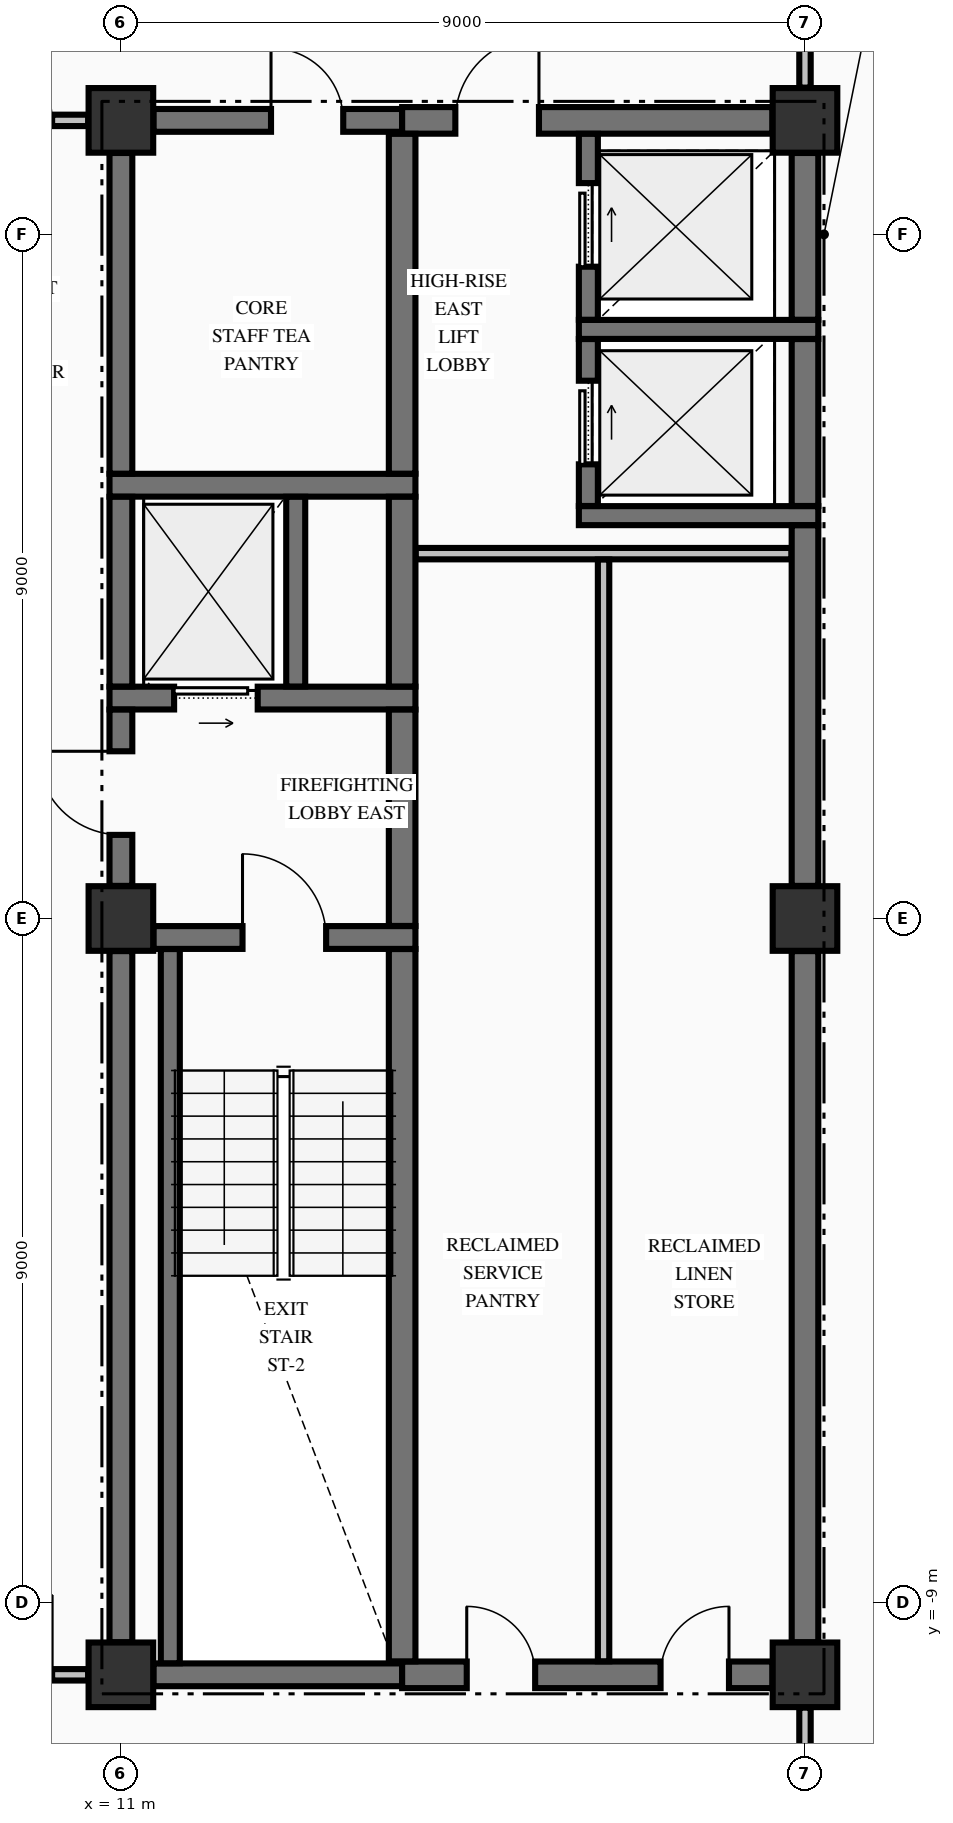
"""IFC4 building model, lengths in metres.
Left out: names, types, materials, properties, quantities, classifications, styles, units other than length and angle.
Written with IfcOpenShell. Run it as: python <this file> out.ifc"""

import sys

from ifc_helpers import new_model, si_unit, direction, frame, frame_2d, origin, origin_2d, place, context, subcontext, project, spatial, rectangle, extrude, element, fill, save


model = new_model("IFC4")
c1 = context("Model", 3, precision=1e-05, world=origin(), true_north=direction((0.0, 1.0)))
c2 = subcontext(c1, "Body", "Model", "MODEL_VIEW")
j1 = project(units=[si_unit("LENGTHUNIT", "METRE"), si_unit("PLANEANGLEUNIT", "RADIAN")], contexts=[c1])
p1 = place(None, origin())
s1 = spatial("IfcSite", under=j1, at=p1, CompositionType="ELEMENT")
p2 = place(p1, origin())
s2 = spatial("IfcBuilding", under=s1, at=p2, CompositionType="ELEMENT")
p3 = place(p2, frame((0.0, 0.0, 211.86)))
s3 = spatial("IfcBuildingStorey", under=s2, at=p3, CompositionType="ELEMENT", Elevation=211.86)
for number, where, z_axis, x_axis in (
    (1, (11.0, -9.95, -0.325), (0.0, 0.0, 1.0), (1.0, 0.0, 0.0)),
    (2, (11.0, 0.0, -0.325), (0.0, 0.0, 1.0), (1.0, 0.0, 0.0)),
    (3, (11.0, 10.5, -0.325), (0.0, 0.0, 1.0), (1.0, 0.0, 0.0)),
    (4, (20.0, -9.95, -0.325), (0.0, 0.0, 1.0), (1.0, 0.0, 0.0)),
    (5, (20.0, 10.5, -0.325), (0.0, 0.0, 1.0), (1.0, 0.0, 0.0)),
    (6, (20.0, 0.0, -0.325), (0.0, 0.0, 1.0), (1.0, 0.0, 0.0)),
):
    element("IfcColumn", number, at=place(p3, frame(where, z_axis=z_axis, x_axis=x_axis)), inside=s3, PredefinedType="COLUMN", context=c2, shape_type="SweptSolid", body=[
        extrude(rectangle(XDim=0.85, YDim=0.85, at=origin_2d()), origin(), (0.0, 0.0, 1.0), 3.475),
    ])
p4 = place(p3, frame((11.429, -9.95, 0.0), z_axis=(0.0, 0.0, 1.0), x_axis=(1.0, 0.0, 0.0)))
e7 = element("IfcWall", 7, at=p4, inside=s3, PredefinedType="SHEAR", context=c2, shape_type="SweptSolid", body=[
    extrude(rectangle(XDim=3.271, YDim=0.3, at=frame_2d((1.635, 0.0))), origin(), (0.0, 0.0, 1.0), 3.15),
])
p5 = place(p3, frame((14.7, -9.95, 0.0), z_axis=(0.0, 0.0, 1.0), x_axis=(1.0, 0.0, 0.0)))
e8 = element("IfcWall", 8, at=p5, inside=s3, PredefinedType="SHEAR", context=c2, shape_type="SweptSolid", body=[
    extrude(rectangle(XDim=4.871, YDim=0.35, at=frame_2d((2.436, 0.0))), origin(), (0.0, 0.0, 1.0), 3.15),
])
p6 = place(p5, frame((0.85, 0.0, 0.0)))
e9 = element("IfcOpeningElement", 9, at=p6, cuts=e8, PredefinedType="OPENING", context=c2, shape_type="SweptSolid", body=[
    extrude(rectangle(XDim=0.9, YDim=2.15, at=frame_2d((0.45, 1.075))), frame((0.0, 0.185, 0.0), z_axis=(0.0, -1.0, 0.0), x_axis=(1.0, 0.0, 0.0)), (0.0, 0.0, 1.0), 0.37),
])
p7 = place(p5, frame((3.4, 0.0, 0.0)))
e10 = element("IfcOpeningElement", 10, at=p7, cuts=e8, PredefinedType="OPENING", context=c2, shape_type="SweptSolid", body=[
    extrude(rectangle(XDim=0.9, YDim=2.15, at=frame_2d((0.45, 1.075))), frame((0.0, 0.185, 0.0), z_axis=(0.0, -1.0, 0.0), x_axis=(1.0, 0.0, 0.0)), (0.0, 0.0, 1.0), 0.37),
])
p8 = place(p3, frame((11.429, -0.25, 0.0), z_axis=(0.0, 0.0, 1.0), x_axis=(1.0, 0.0, 0.0)))
e11 = element("IfcWall", 11, at=p8, inside=s3, PredefinedType="SHEAR", context=c2, shape_type="SweptSolid", body=[
    extrude(rectangle(XDim=3.446, YDim=0.3, at=frame_2d((1.723, 0.0))), origin(), (0.0, 0.0, 1.0), 3.15),
])
p9 = place(p8, frame((1.171, 0.0, 0.0)))
e12 = element("IfcOpeningElement", 12, at=p9, cuts=e11, PredefinedType="OPENING", context=c2, shape_type="SweptSolid", body=[
    extrude(rectangle(XDim=1.1, YDim=2.15, at=frame_2d((0.55, 1.075))), frame((0.0, 0.16, 0.0), z_axis=(0.0, -1.0, 0.0), x_axis=(1.0, 0.0, 0.0)), (0.0, 0.0, 1.0), 0.32),
])
p10 = place(p3, frame((10.85, 2.9, 0.0), z_axis=(0.0, 0.0, 1.0), x_axis=(1.0, 0.0, 0.0)))
e13 = element("IfcWall", 13, at=p10, inside=s3, PredefinedType="SHEAR", context=c2, shape_type="SweptSolid", body=[
    extrude(rectangle(XDim=4.025, YDim=0.3, at=frame_2d((2.012, 0.0))), origin(), (0.0, 0.0, 1.0), 3.15),
])
p11 = place(p10, frame((0.85, 0.0, 0.0)))
e14 = element("IfcOpeningElement", 14, at=p11, cuts=e13, PredefinedType="OPENING", context=c2, shape_type="SweptSolid", body=[
    extrude(rectangle(XDim=1.1, YDim=2.2, at=frame_2d((0.55, 1.1))), frame((0.0, 0.16, 0.0), z_axis=(0.0, -1.0, 0.0), x_axis=(1.0, 0.0, 0.0)), (0.0, 0.0, 1.0), 0.32),
])
p12 = place(p3, frame((17.025, 5.3, 0.0), z_axis=(0.0, 0.0, 1.0), x_axis=(1.0, 0.0, 0.0)))
e15 = element("IfcWall", 15, at=p12, inside=s3, PredefinedType="SOLIDWALL", context=c2, shape_type="SweptSolid", body=[
    extrude(rectangle(XDim=3.15, YDim=0.25, at=frame_2d((1.575, 0.0))), origin(), (0.0, 0.0, 1.0), 3.15),
])
p13 = place(p3, frame((10.85, 5.7, 0.0), z_axis=(0.0, 0.0, 1.0), x_axis=(1.0, 0.0, 0.0)))
e16 = element("IfcWall", 16, at=p13, inside=s3, PredefinedType="SHEAR", context=c2, shape_type="SweptSolid", body=[
    extrude(rectangle(XDim=4.025, YDim=0.3, at=frame_2d((2.012, 0.0))), origin(), (0.0, 0.0, 1.0), 3.15),
])
p14 = place(p3, frame((17.025, 7.75, 0.0), z_axis=(0.0, 0.0, 1.0), x_axis=(1.0, 0.0, 0.0)))
e17 = element("IfcWall", 17, at=p14, inside=s3, PredefinedType="SOLIDWALL", context=c2, shape_type="SweptSolid", body=[
    extrude(rectangle(XDim=3.15, YDim=0.25, at=frame_2d((1.575, 0.0))), origin(), (0.0, 0.0, 1.0), 3.15),
])
p15 = place(p3, frame((11.429, 10.5, 0.0), z_axis=(0.0, 0.0, 1.0), x_axis=(1.0, 0.0, 0.0)))
e18 = element("IfcWall", 18, at=p15, inside=s3, PredefinedType="SHEAR", context=c2, shape_type="SweptSolid", body=[
    extrude(rectangle(XDim=3.271, YDim=0.3, at=frame_2d((1.635, 0.0))), origin(), (0.0, 0.0, 1.0), 3.15),
])
p16 = place(p15, frame((1.546, 0.0, 0.0)))
e19 = element("IfcOpeningElement", 19, at=p16, cuts=e18, PredefinedType="OPENING", context=c2, shape_type="SweptSolid", body=[
    extrude(rectangle(XDim=0.95, YDim=2.15, at=frame_2d((0.475, 1.075))), frame((0.0, 0.16, 0.0), z_axis=(0.0, -1.0, 0.0), x_axis=(1.0, 0.0, 0.0)), (0.0, 0.0, 1.0), 0.32),
])
p17 = place(p3, frame((14.7, 10.5, 0.0), z_axis=(0.0, 0.0, 1.0), x_axis=(1.0, 0.0, 0.0)))
e20 = element("IfcWall", 20, at=p17, inside=s3, PredefinedType="SHEAR", context=c2, shape_type="SweptSolid", body=[
    extrude(rectangle(XDim=4.871, YDim=0.35, at=frame_2d((2.436, 0.0))), origin(), (0.0, 0.0, 1.0), 3.15),
])
p18 = place(p17, frame((0.7, 0.0, 0.0)))
e21 = element("IfcOpeningElement", 21, at=p18, cuts=e20, PredefinedType="OPENING", context=c2, shape_type="SweptSolid", body=[
    extrude(rectangle(XDim=1.1, YDim=2.15, at=frame_2d((0.55, 1.075))), frame((0.0, 0.185, 0.0), z_axis=(0.0, -1.0, 0.0), x_axis=(1.0, 0.0, 0.0)), (0.0, 0.0, 1.0), 0.37),
])
p19 = place(p3, frame((-10.569, -9.95, 0.0), z_axis=(0.0, 0.0, 1.0), x_axis=(1.0, 0.0, 0.0)))
e22 = element("IfcWall", 22, at=p19, inside=s3, PredefinedType="PARTITIONING", context=c2, shape_type="SweptSolid", body=[
    extrude(rectangle(XDim=21.138, YDim=0.15, at=frame_2d((10.569, 0.0))), origin(), (0.0, 0.0, 1.0), 3.15),
])
p20 = place(p19, frame((0.474, 0.0, 0.0)))
e23 = element("IfcOpeningElement", 23, at=p20, cuts=e22, PredefinedType="OPENING", context=c2, shape_type="SweptSolid", body=[
    extrude(rectangle(XDim=1.05, YDim=2.15, at=frame_2d((0.525, 1.075))), frame((0.0, 0.085, 0.0), z_axis=(0.0, -1.0, 0.0), x_axis=(1.0, 0.0, 0.0)), (0.0, 0.0, 1.0), 0.17),
])
p21 = place(p19, frame((19.614, 0.0, 0.0)))
e24 = element("IfcOpeningElement", 24, at=p21, cuts=e22, PredefinedType="OPENING", context=c2, shape_type="SweptSolid", body=[
    extrude(rectangle(XDim=1.05, YDim=2.15, at=frame_2d((0.525, 1.075))), frame((0.0, 0.085, 0.0), z_axis=(0.0, -1.0, 0.0), x_axis=(1.0, 0.0, 0.0)), (0.0, 0.0, 1.0), 0.17),
])
p22 = place(p19, frame((11.774, 0.0, 0.0)))
e25 = element("IfcOpeningElement", 25, at=p22, cuts=e22, PredefinedType="OPENING", context=c2, shape_type="SweptSolid", body=[
    extrude(rectangle(XDim=0.95, YDim=2.15, at=frame_2d((0.475, 1.075))), frame((0.0, 0.085, 0.0), z_axis=(0.0, -1.0, 0.0), x_axis=(1.0, 0.0, 0.0)), (0.0, 0.0, 1.0), 0.17),
])
p23 = place(p3, frame((14.878, 4.8, 0.0), z_axis=(0.0, 0.0, 1.0), x_axis=(1.0, 0.0, 0.0)))
e26 = element("IfcWall", 26, at=p23, inside=s3, PredefinedType="PARTITIONING", context=c2, shape_type="SweptSolid", body=[
    extrude(rectangle(XDim=4.944, YDim=0.15, at=frame_2d((2.472, 0.0))), origin(), (0.0, 0.0, 1.0), 3.15),
])
p24 = place(p3, frame((-10.569, 10.5, 0.0), z_axis=(0.0, 0.0, 1.0), x_axis=(1.0, 0.0, 0.0)))
e27 = element("IfcWall", 27, at=p24, inside=s3, PredefinedType="PARTITIONING", context=c2, shape_type="SweptSolid", body=[
    extrude(rectangle(XDim=21.138, YDim=0.15, at=frame_2d((10.569, 0.0))), origin(), (0.0, 0.0, 1.0), 3.15),
])
p25 = place(p24, frame((0.474, 0.0, 0.0)))
e28 = element("IfcOpeningElement", 28, at=p25, cuts=e27, PredefinedType="OPENING", context=c2, shape_type="SweptSolid", body=[
    extrude(rectangle(XDim=1.05, YDim=2.15, at=frame_2d((0.525, 1.075))), frame((0.0, 0.085, 0.0), z_axis=(0.0, -1.0, 0.0), x_axis=(1.0, 0.0, 0.0)), (0.0, 0.0, 1.0), 0.17),
])
p26 = place(p24, frame((19.614, 0.0, 0.0)))
e29 = element("IfcOpeningElement", 29, at=p26, cuts=e27, PredefinedType="OPENING", context=c2, shape_type="SweptSolid", body=[
    extrude(rectangle(XDim=1.05, YDim=2.15, at=frame_2d((0.525, 1.075))), frame((0.0, 0.085, 0.0), z_axis=(0.0, -1.0, 0.0), x_axis=(1.0, 0.0, 0.0)), (0.0, 0.0, 1.0), 0.17),
])
p27 = place(p3, frame((11.0, -9.521, 0.0), z_axis=(0.0, 0.0, 1.0), x_axis=(0.0, 1.0, 0.0)))
e30 = element("IfcWall", 30, at=p27, inside=s3, PredefinedType="SHEAR", context=c2, shape_type="SweptSolid", body=[
    extrude(rectangle(XDim=9.092, YDim=0.3, at=frame_2d((4.546, 0.0))), origin(), (0.0, 0.0, 1.0), 3.15),
])
p28 = place(p3, frame((11.0, 0.429, 0.0), z_axis=(0.0, 0.0, 1.0), x_axis=(0.0, 1.0, 0.0)))
e31 = element("IfcWall", 31, at=p28, inside=s3, PredefinedType="SHEAR", context=c2, shape_type="SweptSolid", body=[
    extrude(rectangle(XDim=2.319, YDim=0.3, at=frame_2d((1.16, 0.0))), origin(), (0.0, 0.0, 1.0), 3.15),
])
p29 = place(p28, frame((0.671, 0.0, 0.0)))
e32 = element("IfcOpeningElement", 32, at=p29, cuts=e31, PredefinedType="OPENING", context=c2, shape_type="SweptSolid", body=[
    extrude(rectangle(XDim=1.1, YDim=2.15, at=frame_2d((0.55, 1.075))), frame((0.0, 0.16, 0.0), z_axis=(0.0, -1.0, 0.0), x_axis=(1.0, 0.0, 0.0)), (0.0, 0.0, 1.0), 0.32),
])
p30 = place(p3, frame((11.0, 3.052, 0.0), z_axis=(0.0, 0.0, 1.0), x_axis=(0.0, 1.0, 0.0)))
e33 = element("IfcWall", 33, at=p30, inside=s3, PredefinedType="SHEAR", context=c2, shape_type="SweptSolid", body=[
    extrude(rectangle(XDim=2.496, YDim=0.3, at=frame_2d((1.248, 0.0))), origin(), (0.0, 0.0, 1.0), 3.15),
])
p31 = place(p3, frame((11.0, 5.852, 0.0), z_axis=(0.0, 0.0, 1.0), x_axis=(0.0, 1.0, 0.0)))
e34 = element("IfcWall", 34, at=p31, inside=s3, PredefinedType="SHEAR", context=c2, shape_type="SweptSolid", body=[
    extrude(rectangle(XDim=4.219, YDim=0.3, at=frame_2d((2.109, 0.0))), origin(), (0.0, 0.0, 1.0), 3.15),
])
p32 = place(p3, frame((11.65, -9.798, 0.0), z_axis=(0.0, 0.0, 1.0), x_axis=(0.0, 1.0, 0.0)))
e35 = element("IfcWall", 35, at=p32, inside=s3, PredefinedType="SOLIDWALL", context=c2, shape_type="SweptSolid", body=[
    extrude(rectangle(XDim=9.396, YDim=0.25, at=frame_2d((4.698, 0.0))), origin(), (0.0, 0.0, 1.0), 3.15),
])
p33 = place(p3, frame((13.3, 3.052, 0.0), z_axis=(0.0, 0.0, 1.0), x_axis=(0.0, 1.0, 0.0)))
e36 = element("IfcWall", 36, at=p33, inside=s3, PredefinedType="SOLIDWALL", context=c2, shape_type="SweptSolid", body=[
    extrude(rectangle(XDim=2.496, YDim=0.25, at=frame_2d((1.248, 0.0))), origin(), (0.0, 0.0, 1.0), 3.15),
])
p34 = place(p3, frame((14.7, -9.773, 0.0), z_axis=(0.0, 0.0, 1.0), x_axis=(0.0, 1.0, 0.0)))
e37 = element("IfcWall", 37, at=p34, inside=s3, PredefinedType="SHEAR", context=c2, shape_type="SweptSolid", body=[
    extrude(rectangle(XDim=9.371, YDim=0.35, at=frame_2d((4.686, 0.0))), origin(), (0.0, 0.0, 1.0), 3.15),
])
p35 = place(p3, frame((14.7, -0.098, 0.0), z_axis=(0.0, 0.0, 1.0), x_axis=(0.0, 1.0, 0.0)))
e38 = element("IfcWall", 38, at=p35, inside=s3, PredefinedType="SHEAR", context=c2, shape_type="SweptSolid", body=[
    extrude(rectangle(XDim=2.846, YDim=0.35, at=frame_2d((1.423, 0.0))), origin(), (0.0, 0.0, 1.0), 3.15),
])
p36 = place(p3, frame((14.7, 3.052, 0.0), z_axis=(0.0, 0.0, 1.0), x_axis=(0.0, 1.0, 0.0)))
e39 = element("IfcWall", 39, at=p36, inside=s3, PredefinedType="SHEAR", context=c2, shape_type="SweptSolid", body=[
    extrude(rectangle(XDim=2.496, YDim=0.35, at=frame_2d((1.248, 0.0))), origin(), (0.0, 0.0, 1.0), 3.15),
])
p37 = place(p3, frame((14.7, 5.852, 0.0), z_axis=(0.0, 0.0, 1.0), x_axis=(0.0, 1.0, 0.0)))
e40 = element("IfcWall", 40, at=p37, inside=s3, PredefinedType="SHEAR", context=c2, shape_type="SweptSolid", body=[
    extrude(rectangle(XDim=4.471, YDim=0.35, at=frame_2d((2.235, 0.0))), origin(), (0.0, 0.0, 1.0), 3.15),
])
p38 = place(p3, frame((17.15, 5.427, 0.0), z_axis=(0.0, 0.0, 1.0), x_axis=(0.0, 1.0, 0.0)))
e41 = element("IfcWall", 41, at=p38, inside=s3, PredefinedType="SOLIDWALL", context=c2, shape_type="SweptSolid", body=[
    extrude(rectangle(XDim=2.196, YDim=0.25, at=frame_2d((1.098, 0.0))), origin(), (0.0, 0.0, 1.0), 3.15),
])
p39 = place(p38, frame((0.548, 0.0, 0.0)))
e42 = element("IfcOpeningElement", 42, at=p39, cuts=e41, PredefinedType="OPENING", context=c2, shape_type="SweptSolid", body=[
    extrude(rectangle(XDim=1.1, YDim=2.2, at=frame_2d((0.55, 1.1))), frame((0.0, 0.135, 0.0), z_axis=(0.0, -1.0, 0.0), x_axis=(1.0, 0.0, 0.0)), (0.0, 0.0, 1.0), 0.27),
])
p40 = place(p3, frame((17.15, 7.877, 0.0), z_axis=(0.0, 0.0, 1.0), x_axis=(0.0, 1.0, 0.0)))
e43 = element("IfcWall", 43, at=p40, inside=s3, PredefinedType="SOLIDWALL", context=c2, shape_type="SweptSolid", body=[
    extrude(rectangle(XDim=2.446, YDim=0.25, at=frame_2d((1.223, 0.0))), origin(), (0.0, 0.0, 1.0), 3.15),
])
p41 = place(p40, frame((0.698, 0.0, 0.0)))
e44 = element("IfcOpeningElement", 44, at=p41, cuts=e43, PredefinedType="OPENING", context=c2, shape_type="SweptSolid", body=[
    extrude(rectangle(XDim=1.1, YDim=2.2, at=frame_2d((0.55, 1.1))), frame((0.0, 0.135, 0.0), z_axis=(0.0, -1.0, 0.0), x_axis=(1.0, 0.0, 0.0)), (0.0, 0.0, 1.0), 0.27),
])
p42 = place(p3, frame((20.0, -9.521, 0.0), z_axis=(0.0, 0.0, 1.0), x_axis=(0.0, 1.0, 0.0)))
e45 = element("IfcWall", 45, at=p42, inside=s3, PredefinedType="SHEAR", context=c2, shape_type="SweptSolid", body=[
    extrude(rectangle(XDim=9.092, YDim=0.35, at=frame_2d((4.546, 0.0))), origin(), (0.0, 0.0, 1.0), 3.15),
])
p43 = place(p3, frame((20.0, 0.429, 0.0), z_axis=(0.0, 0.0, 1.0), x_axis=(0.0, 1.0, 0.0)))
e46 = element("IfcWall", 46, at=p43, inside=s3, PredefinedType="SHEAR", context=c2, shape_type="SweptSolid", body=[
    extrude(rectangle(XDim=4.744, YDim=0.35, at=frame_2d((2.372, 0.0))), origin(), (0.0, 0.0, 1.0), 3.15),
])
p44 = place(p3, frame((20.0, 5.427, 0.0), z_axis=(0.0, 0.0, 1.0), x_axis=(0.0, 1.0, 0.0)))
e47 = element("IfcWall", 47, at=p44, inside=s3, PredefinedType="SHEAR", context=c2, shape_type="SweptSolid", body=[
    extrude(rectangle(XDim=2.196, YDim=0.35, at=frame_2d((1.098, 0.0))), origin(), (0.0, 0.0, 1.0), 3.15),
])
p45 = place(p3, frame((20.0, 7.877, 0.0), z_axis=(0.0, 0.0, 1.0), x_axis=(0.0, 1.0, 0.0)))
e48 = element("IfcWall", 48, at=p45, inside=s3, PredefinedType="SHEAR", context=c2, shape_type="SweptSolid", body=[
    extrude(rectangle(XDim=2.194, YDim=0.35, at=frame_2d((1.097, 0.0))), origin(), (0.0, 0.0, 1.0), 3.15),
])
p46 = place(p3, frame((17.35, -9.772, 0.0), z_axis=(0.0, 0.0, 1.0), x_axis=(0.0, 1.0, 0.0)))
e49 = element("IfcWall", 49, at=p46, inside=s3, PredefinedType="PARTITIONING", context=c2, shape_type="SweptSolid", body=[
    extrude(rectangle(XDim=14.494, YDim=0.15, at=frame_2d((7.247, 0.0))), origin(), (0.0, 0.0, 1.0), 3.15),
])
p47 = place(p3, frame((20.0, -12.222, 0.0), z_axis=(0.0, 0.0, 1.0), x_axis=(0.0, 1.0, 0.0)))
e50 = element("IfcWall", 50, at=p47, inside=s3, PredefinedType="PARTITIONING", context=c2, shape_type="SweptSolid", body=[
    extrude(rectangle(XDim=1.841, YDim=0.15, at=frame_2d((0.92, 0.0))), origin(), (0.0, 0.0, 1.0), 2.342),
])
p48 = place(p3, frame((20.0, 10.931, 0.0), z_axis=(0.0, 0.0, 1.0), x_axis=(0.0, 1.0, 0.0)))
e51 = element("IfcWall", 51, at=p48, inside=s3, PredefinedType="PARTITIONING", context=c2, shape_type="SweptSolid", body=[
    extrude(rectangle(XDim=2.141, YDim=0.15, at=frame_2d((1.071, 0.0))), origin(), (0.0, 0.0, 1.0), 2.342),
])
p49 = place(p9, origin())
e52 = element("IfcDoor", 52, at=p49, inside=s3, OperationType="SINGLE_SWING_LEFT", PredefinedType="DOOR", context=c2, shape_type="SweptSolid", body=[
    extrude(rectangle(XDim=1.1, YDim=2.15, at=frame_2d((0.55, 1.075))), frame((0.0, 0.025, 0.0), z_axis=(0.0, -1.0, 0.0), x_axis=(1.0, 0.0, 0.0)), (0.0, 0.0, 1.0), 0.05),
])
fill(e12, e52)
p50 = place(p29, origin())
e53 = element("IfcDoor", 53, at=p50, inside=s3, OperationType="SINGLE_SWING_RIGHT", PredefinedType="DOOR", context=c2, shape_type="SweptSolid", body=[
    extrude(rectangle(XDim=1.1, YDim=2.15, at=frame_2d((0.55, 1.075))), frame((0.0, 0.025, 0.0), z_axis=(0.0, -1.0, 0.0), x_axis=(1.0, 0.0, 0.0)), (0.0, 0.0, 1.0), 0.05),
])
fill(e32, e53)
p51 = place(p11, origin())
e54 = element("IfcDoor", 54, at=p51, inside=s3, OperationType="SLIDING_TO_RIGHT", PredefinedType="DOOR", context=c2, shape_type="SweptSolid", body=[
    extrude(rectangle(XDim=1.1, YDim=2.2, at=frame_2d((0.55, 1.1))), frame((0.0, 0.025, 0.0), z_axis=(0.0, -1.0, 0.0), x_axis=(1.0, 0.0, 0.0)), (0.0, 0.0, 1.0), 0.05),
])
fill(e14, e54)
p52 = place(p16, origin())
e55 = element("IfcDoor", 55, at=p52, inside=s3, OperationType="SINGLE_SWING_LEFT", PredefinedType="DOOR", context=c2, shape_type="SweptSolid", body=[
    extrude(rectangle(XDim=0.95, YDim=2.15, at=frame_2d((0.475, 1.075))), frame((0.0, 0.025, 0.0), z_axis=(0.0, -1.0, 0.0), x_axis=(1.0, 0.0, 0.0)), (0.0, 0.0, 1.0), 0.05),
])
fill(e19, e55)
p53 = place(p39, origin())
e56 = element("IfcDoor", 56, at=p53, inside=s3, OperationType="SLIDING_TO_RIGHT", PredefinedType="DOOR", context=c2, shape_type="SweptSolid", body=[
    extrude(rectangle(XDim=1.1, YDim=2.2, at=frame_2d((0.55, 1.1))), frame((0.0, 0.025, 0.0), z_axis=(0.0, -1.0, 0.0), x_axis=(1.0, 0.0, 0.0)), (0.0, 0.0, 1.0), 0.05),
])
fill(e42, e56)
p54 = place(p41, origin())
e57 = element("IfcDoor", 57, at=p54, inside=s3, OperationType="SLIDING_TO_RIGHT", PredefinedType="DOOR", context=c2, shape_type="SweptSolid", body=[
    extrude(rectangle(XDim=1.1, YDim=2.2, at=frame_2d((0.55, 1.1))), frame((0.0, 0.025, 0.0), z_axis=(0.0, -1.0, 0.0), x_axis=(1.0, 0.0, 0.0)), (0.0, 0.0, 1.0), 0.05),
])
fill(e44, e57)
p55 = place(p18, origin())
e58 = element("IfcDoor", 58, at=p55, inside=s3, OperationType="SINGLE_SWING_RIGHT", PredefinedType="DOOR", context=c2, shape_type="SweptSolid", body=[
    extrude(rectangle(XDim=1.1, YDim=2.15, at=frame_2d((0.55, 1.075))), frame((0.0, 0.025, 0.0), z_axis=(0.0, -1.0, 0.0), x_axis=(1.0, 0.0, 0.0)), (0.0, 0.0, 1.0), 0.05),
])
fill(e21, e58)
p56 = place(p6, origin())
e59 = element("IfcDoor", 59, at=p56, inside=s3, OperationType="SINGLE_SWING_LEFT", PredefinedType="DOOR", context=c2, shape_type="SweptSolid", body=[
    extrude(rectangle(XDim=0.9, YDim=2.15, at=frame_2d((0.45, 1.075))), frame((0.0, 0.025, 0.0), z_axis=(0.0, -1.0, 0.0), x_axis=(1.0, 0.0, 0.0)), (0.0, 0.0, 1.0), 0.05),
])
fill(e9, e59)
p57 = place(p7, origin())
e60 = element("IfcDoor", 60, at=p57, inside=s3, OperationType="SINGLE_SWING_RIGHT", PredefinedType="DOOR", context=c2, shape_type="SweptSolid", body=[
    extrude(rectangle(XDim=0.9, YDim=2.15, at=frame_2d((0.45, 1.075))), frame((0.0, 0.025, 0.0), z_axis=(0.0, -1.0, 0.0), x_axis=(1.0, 0.0, 0.0)), (0.0, 0.0, 1.0), 0.05),
])
fill(e10, e60)
save(model, sys.argv[1])
